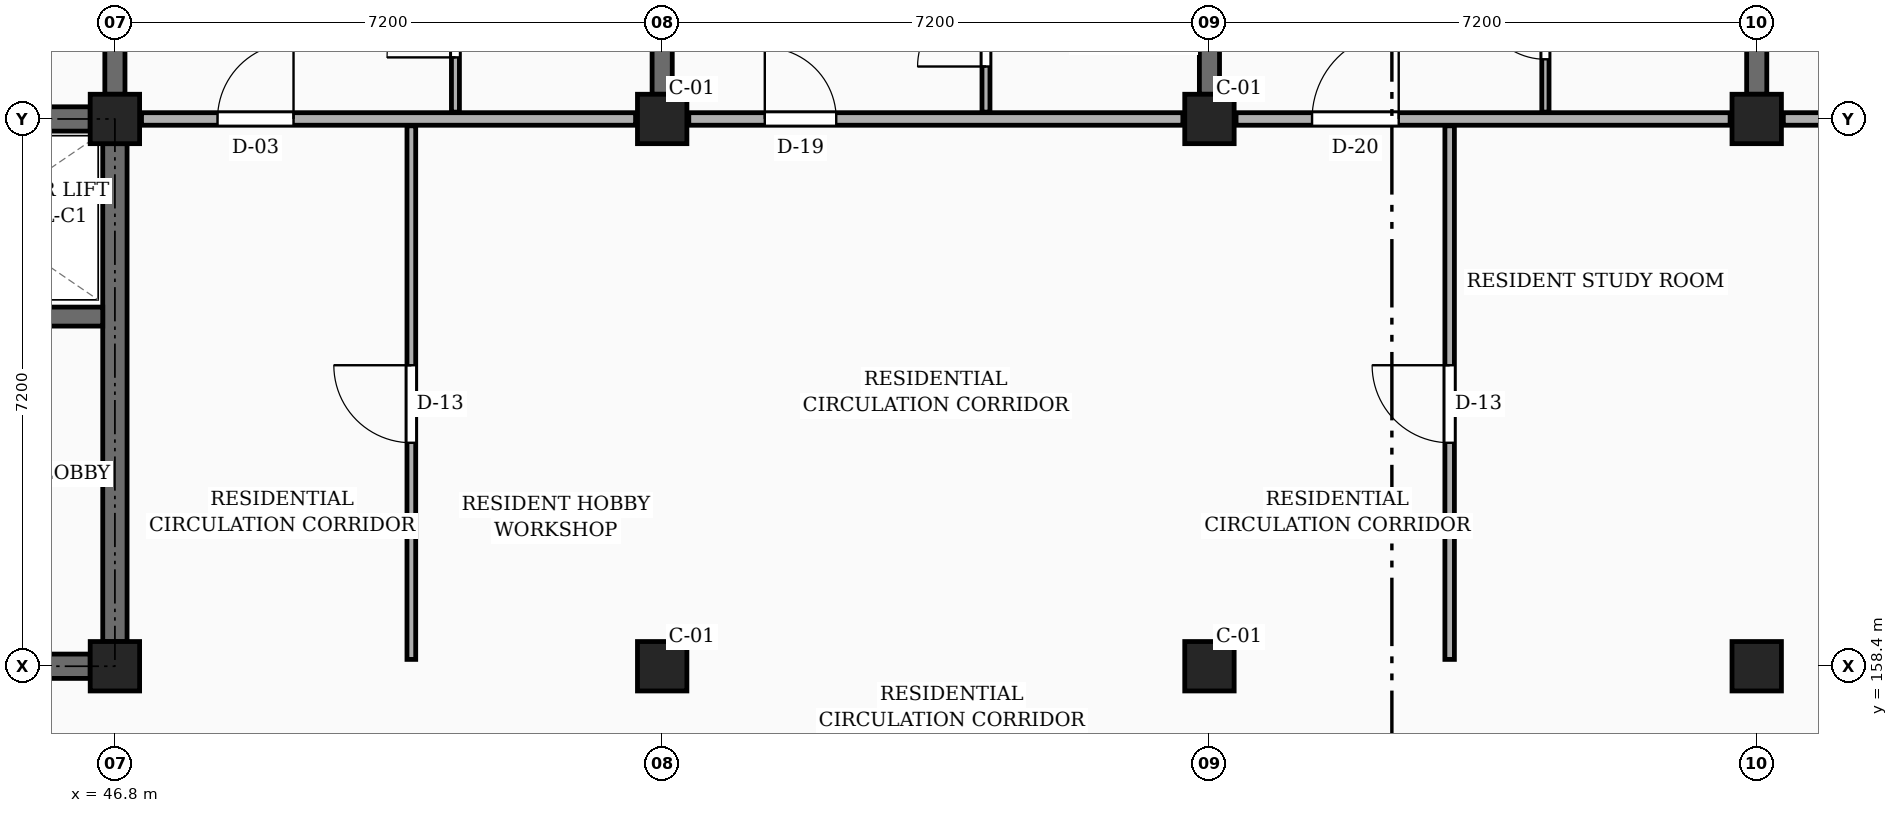
"""IFC4 building model, lengths in metres.
Left out: names, types, materials, properties, quantities, classifications, styles, units other than length and angle.
Written with IfcOpenShell. Run it as: python <this file> out.ifc"""

import sys

from ifc_helpers import new_model, si_unit, direction, frame, frame_2d, origin, origin_2d, place, context, subcontext, project, spatial, rectangle, extrude, element, fill, save


model = new_model("IFC4")
c1 = context("Model", 3, precision=1e-05, world=origin(), true_north=direction((0.0, 1.0)))
c2 = subcontext(c1, "Body", "Model", "MODEL_VIEW")
j1 = project(units=[si_unit("LENGTHUNIT", "METRE"), si_unit("PLANEANGLEUNIT", "RADIAN")], contexts=[c1])
p1 = place(None, origin())
s1 = spatial("IfcSite", under=j1, at=p1, CompositionType="ELEMENT")
p2 = place(p1, origin())
s2 = spatial("IfcBuilding", under=s1, at=p2, CompositionType="ELEMENT")
p3 = place(p2, frame((0.0, 0.0, 7.65)))
s3 = spatial("IfcBuildingStorey", under=s2, at=p3, CompositionType="ELEMENT", Elevation=7.65)
for number, where, z_axis, x_axis in (
    (1, (46.8, 158.4, 0.0), (0.0, 0.0, 1.0), (1.0, 0.0, 0.0)),
    (2, (46.8, 165.6, 0.0), (0.0, 0.0, 1.0), (1.0, 0.0, 0.0)),
    (3, (54.0, 158.4, 0.0), (0.0, 0.0, 1.0), (1.0, 0.0, 0.0)),
    (4, (54.0, 165.6, 0.0), (0.0, 0.0, 1.0), (1.0, 0.0, 0.0)),
    (5, (61.2, 158.4, 0.0), (0.0, 0.0, 1.0), (1.0, 0.0, 0.0)),
    (6, (61.2, 165.6, 0.0), (0.0, 0.0, 1.0), (1.0, 0.0, 0.0)),
    (7, (68.4, 158.4, 0.0), (0.0, 0.0, 1.0), (1.0, 0.0, 0.0)),
    (8, (68.4, 165.6, 0.0), (0.0, 0.0, 1.0), (1.0, 0.0, 0.0)),
):
    element("IfcColumn", number, at=place(p3, frame(where, z_axis=z_axis, x_axis=x_axis)), inside=s3, PredefinedType="COLUMN", context=c2, shape_type="SweptSolid", body=[
        extrude(rectangle(XDim=0.65, YDim=0.65, at=origin_2d()), origin(), (0.0, 0.0, 1.0), 3.15),
    ])
for number, where, z_axis, x_axis in (
    (9, (46.8, 165.925, 0.0), (0.0, 0.0, 1.0), (0.0, 1.0, 0.0)),
    (10, (54.0, 165.925, 0.0), (0.0, 0.0, 1.0), (0.0, 1.0, 0.0)),
    (11, (61.2, 165.925, 0.0), (0.0, 0.0, 1.0), (0.0, 1.0, 0.0)),
    (12, (68.4, 165.925, 0.0), (0.0, 0.0, 1.0), (0.0, 1.0, 0.0)),
):
    element("IfcWall", number, at=place(p3, frame(where, z_axis=z_axis, x_axis=x_axis)), inside=s3, PredefinedType="SOLIDWALL", context=c2, shape_type="SweptSolid", body=[
        extrude(rectangle(XDim=6.575, YDim=0.265, at=frame_2d((3.288, 0.0))), origin(), (0.0, 0.0, 1.0), 2.185),
    ])
p4 = place(p3, frame((39.925, 165.6, 0.0), z_axis=(0.0, 0.0, 1.0), x_axis=(1.0, 0.0, 0.0)))
e13 = element("IfcWall", 13, at=p4, inside=s3, PredefinedType="SHEAR", context=c2, shape_type="SweptSolid", body=[
    extrude(rectangle(XDim=6.55, YDim=0.32, at=frame_2d((3.275, 0.0))), origin(), (0.0, 0.0, 1.0), 2.885),
])
p5 = place(p3, frame((46.8, 158.725, 0.0), z_axis=(0.0, 0.0, 1.0), x_axis=(0.0, 1.0, 0.0)))
e14 = element("IfcWall", 14, at=p5, inside=s3, PredefinedType="SHEAR", context=c2, shape_type="SweptSolid", body=[
    extrude(rectangle(XDim=6.55, YDim=0.32, at=frame_2d((3.275, 0.0))), origin(), (0.0, 0.0, 1.0), 2.885),
])
p6 = place(p3, frame((39.925, 158.4, 0.0), z_axis=(0.0, 0.0, 1.0), x_axis=(1.0, 0.0, 0.0)))
e15 = element("IfcWall", 15, at=p6, inside=s3, PredefinedType="SHEAR", context=c2, shape_type="SweptSolid", body=[
    extrude(rectangle(XDim=6.55, YDim=0.32, at=frame_2d((3.275, 0.0))), origin(), (0.0, 0.0, 1.0), 2.885),
])
p7 = place(p6, frame((4.425, 0.0, 0.0)))
e16 = element("IfcOpeningElement", 16, at=p7, cuts=e15, PredefinedType="OPENING", context=c2, shape_type="SweptSolid", body=[
    extrude(rectangle(XDim=1.1, YDim=2.15, at=frame_2d((0.55, 1.075))), frame((0.0, 0.17, 0.0), z_axis=(0.0, -1.0, 0.0), x_axis=(1.0, 0.0, 0.0)), (0.0, 0.0, 1.0), 0.34),
])
p8 = place(p3, frame((43.325, 163.0, 0.0), z_axis=(0.0, 0.0, 1.0), x_axis=(1.0, 0.0, 0.0)))
e17 = element("IfcWall", 17, at=p8, inside=s3, PredefinedType="SHEAR", context=c2, shape_type="SweptSolid", body=[
    extrude(rectangle(XDim=3.315, YDim=0.25, at=frame_2d((1.657, 0.0))), origin(), (0.0, 0.0, 1.0), 2.885),
])
p9 = place(p8, frame((1.1, 0.0, 0.0)))
e18 = element("IfcOpeningElement", 18, at=p9, cuts=e17, PredefinedType="OPENING", context=c2, shape_type="SweptSolid", body=[
    extrude(rectangle(XDim=1.0, YDim=2.2, at=frame_2d((0.5, 1.1))), frame((0.0, 0.135, 0.0), z_axis=(0.0, -1.0, 0.0), x_axis=(1.0, 0.0, 0.0)), (0.0, 0.0, 1.0), 0.27),
])
p10 = place(p3, frame((47.15, 165.6, 0.0), z_axis=(0.0, 0.0, 1.0), x_axis=(1.0, 0.0, 0.0)))
e19 = element("IfcWall", 19, at=p10, inside=s3, PredefinedType="PARTITIONING", context=c2, shape_type="SweptSolid", body=[
    extrude(rectangle(XDim=6.5, YDim=0.165, at=frame_2d((3.25, 0.0))), origin(), (0.0, 0.0, 1.0), 2.185),
])
p11 = place(p10, frame((1.0, 0.0, 0.0)))
e20 = element("IfcOpeningElement", 20, at=p11, cuts=e19, PredefinedType="OPENING", context=c2, shape_type="SweptSolid", body=[
    extrude(rectangle(XDim=1.0, YDim=2.15, at=frame_2d((0.5, 1.075))), frame((0.0, 0.093, 0.0), z_axis=(0.0, -1.0, 0.0), x_axis=(1.0, 0.0, 0.0)), (0.0, 0.0, 1.0), 0.185),
])
p12 = place(p3, frame((54.35, 165.6, 0.0), z_axis=(0.0, 0.0, 1.0), x_axis=(1.0, 0.0, 0.0)))
e21 = element("IfcWall", 21, at=p12, inside=s3, PredefinedType="PARTITIONING", context=c2, shape_type="SweptSolid", body=[
    extrude(rectangle(XDim=6.5, YDim=0.165, at=frame_2d((3.25, 0.0))), origin(), (0.0, 0.0, 1.0), 2.185),
])
p13 = place(p12, frame((1.0, 0.0, 0.0)))
e22 = element("IfcOpeningElement", 22, at=p13, cuts=e21, PredefinedType="OPENING", context=c2, shape_type="SweptSolid", body=[
    extrude(rectangle(XDim=0.94, YDim=2.12, at=frame_2d((0.47, 1.06))), frame((0.0, 0.093, 0.0), z_axis=(0.0, -1.0, 0.0), x_axis=(1.0, 0.0, 0.0)), (0.0, 0.0, 1.0), 0.185),
])
p14 = place(p3, frame((61.55, 165.6, 0.0), z_axis=(0.0, 0.0, 1.0), x_axis=(1.0, 0.0, 0.0)))
e23 = element("IfcWall", 23, at=p14, inside=s3, PredefinedType="PARTITIONING", context=c2, shape_type="SweptSolid", body=[
    extrude(rectangle(XDim=6.5, YDim=0.165, at=frame_2d((3.25, 0.0))), origin(), (0.0, 0.0, 1.0), 2.185),
])
p15 = place(p14, frame((1.0, 0.0, 0.0)))
e24 = element("IfcOpeningElement", 24, at=p15, cuts=e23, PredefinedType="OPENING", context=c2, shape_type="SweptSolid", body=[
    extrude(rectangle(XDim=1.14, YDim=2.18, at=frame_2d((0.57, 1.09))), frame((0.0, 0.093, 0.0), z_axis=(0.0, -1.0, 0.0), x_axis=(1.0, 0.0, 0.0)), (0.0, 0.0, 1.0), 0.185),
])
p16 = place(p3, frame((68.75, 165.6, 0.0), z_axis=(0.0, 0.0, 1.0), x_axis=(1.0, 0.0, 0.0)))
e25 = element("IfcWall", 25, at=p16, inside=s3, PredefinedType="PARTITIONING", context=c2, shape_type="SweptSolid", body=[
    extrude(rectangle(XDim=6.5, YDim=0.165, at=frame_2d((3.25, 0.0))), origin(), (0.0, 0.0, 1.0), 2.185),
])
p17 = place(p16, frame((1.0, 0.0, 0.0)))
e26 = element("IfcOpeningElement", 26, at=p17, cuts=e25, PredefinedType="OPENING", context=c2, shape_type="SweptSolid", body=[
    extrude(rectangle(XDim=1.0, YDim=2.15, at=frame_2d((0.5, 1.075))), frame((0.0, 0.093, 0.0), z_axis=(0.0, -1.0, 0.0), x_axis=(1.0, 0.0, 0.0)), (0.0, 0.0, 1.0), 0.185),
])
p18 = place(p3, frame((50.7, 158.49, 0.0), z_axis=(0.0, 0.0, 1.0), x_axis=(0.0, 1.0, 0.0)))
e27 = element("IfcWall", 27, at=p18, inside=s3, PredefinedType="PARTITIONING", context=c2, shape_type="SweptSolid", body=[
    extrude(rectangle(XDim=7.02, YDim=0.115, at=frame_2d((3.51, 0.0))), origin(), (0.0, 0.0, 1.0), 2.32),
])
p19 = place(p18, frame((2.85, 0.0, 0.0)))
e28 = element("IfcOpeningElement", 28, at=p19, cuts=e27, PredefinedType="OPENING", context=c2, shape_type="SweptSolid", body=[
    extrude(rectangle(XDim=1.02, YDim=2.15, at=frame_2d((0.51, 1.075))), frame((0.0, 0.067, 0.0), z_axis=(0.0, -1.0, 0.0), x_axis=(1.0, 0.0, 0.0)), (0.0, 0.0, 1.0), 0.135),
])
p20 = place(p3, frame((51.28, 165.69, 0.0), z_axis=(0.0, 0.0, 1.0), x_axis=(0.0, 1.0, 0.0)))
e29 = element("IfcWall", 29, at=p20, inside=s3, PredefinedType="PARTITIONING", context=c2, shape_type="SweptSolid", body=[
    extrude(rectangle(XDim=2.34, YDim=0.105, at=frame_2d((1.17, 0.0))), origin(), (0.0, 0.0, 1.0), 2.32),
])
p21 = place(p20, frame((0.72, 0.0, 0.0)))
e30 = element("IfcOpeningElement", 30, at=p21, cuts=e29, PredefinedType="OPENING", context=c2, shape_type="SweptSolid", body=[
    extrude(rectangle(XDim=0.9, YDim=2.05, at=frame_2d((0.45, 1.025))), frame((0.0, 0.062, 0.0), z_axis=(0.0, -1.0, 0.0), x_axis=(1.0, 0.0, 0.0)), (0.0, 0.0, 1.0), 0.125),
])
p22 = place(p3, frame((58.26, 165.69, 0.0), z_axis=(0.0, 0.0, 1.0), x_axis=(0.0, 1.0, 0.0)))
e31 = element("IfcWall", 31, at=p22, inside=s3, PredefinedType="PARTITIONING", context=c2, shape_type="SweptSolid", body=[
    extrude(rectangle(XDim=2.1, YDim=0.105, at=frame_2d((1.05, 0.0))), origin(), (0.0, 0.0, 1.0), 2.32),
])
p23 = place(p22, frame((0.6, 0.0, 0.0)))
e32 = element("IfcOpeningElement", 32, at=p23, cuts=e31, PredefinedType="OPENING", context=c2, shape_type="SweptSolid", body=[
    extrude(rectangle(XDim=0.9, YDim=2.05, at=frame_2d((0.45, 1.025))), frame((0.0, 0.062, 0.0), z_axis=(0.0, -1.0, 0.0), x_axis=(1.0, 0.0, 0.0)), (0.0, 0.0, 1.0), 0.125),
])
p24 = place(p3, frame((64.36, 158.49, 0.0), z_axis=(0.0, 0.0, 1.0), x_axis=(0.0, 1.0, 0.0)))
e33 = element("IfcWall", 33, at=p24, inside=s3, PredefinedType="PARTITIONING", context=c2, shape_type="SweptSolid", body=[
    extrude(rectangle(XDim=7.02, YDim=0.125, at=frame_2d((3.51, 0.0))), origin(), (0.0, 0.0, 1.0), 2.32),
])
p25 = place(p24, frame((2.85, 0.0, 0.0)))
e34 = element("IfcOpeningElement", 34, at=p25, cuts=e33, PredefinedType="OPENING", context=c2, shape_type="SweptSolid", body=[
    extrude(rectangle(XDim=1.02, YDim=2.15, at=frame_2d((0.51, 1.075))), frame((0.0, 0.073, 0.0), z_axis=(0.0, -1.0, 0.0), x_axis=(1.0, 0.0, 0.0)), (0.0, 0.0, 1.0), 0.145),
])
p26 = place(p3, frame((65.62, 165.69, 0.0), z_axis=(0.0, 0.0, 1.0), x_axis=(0.0, 1.0, 0.0)))
e35 = element("IfcWall", 35, at=p26, inside=s3, PredefinedType="PARTITIONING", context=c2, shape_type="SweptSolid", body=[
    extrude(rectangle(XDim=2.26, YDim=0.095, at=frame_2d((1.13, 0.0))), origin(), (0.0, 0.0, 1.0), 2.32),
])
p27 = place(p26, frame((0.695, 0.0, 0.0)))
e36 = element("IfcOpeningElement", 36, at=p27, cuts=e35, PredefinedType="OPENING", context=c2, shape_type="SweptSolid", body=[
    extrude(rectangle(XDim=0.87, YDim=2.05, at=frame_2d((0.435, 1.025))), frame((0.0, 0.058, 0.0), z_axis=(0.0, -1.0, 0.0), x_axis=(1.0, 0.0, 0.0)), (0.0, 0.0, 1.0), 0.115),
])
p28 = place(p11, origin())
e37 = element("IfcDoor", 37, at=p28, inside=s3, OperationType="SINGLE_SWING_RIGHT", PredefinedType="DOOR", context=c2, shape_type="SweptSolid", body=[
    extrude(rectangle(XDim=1.0, YDim=2.15, at=frame_2d((0.5, 1.075))), frame((0.0, 0.025, 0.0), z_axis=(0.0, -1.0, 0.0), x_axis=(1.0, 0.0, 0.0)), (0.0, 0.0, 1.0), 0.05),
])
fill(e20, e37)
p29 = place(p13, origin())
e38 = element("IfcDoor", 38, at=p29, inside=s3, OperationType="SINGLE_SWING_LEFT", PredefinedType="DOOR", context=c2, shape_type="SweptSolid", body=[
    extrude(rectangle(XDim=0.94, YDim=2.12, at=frame_2d((0.47, 1.06))), frame((0.0, 0.025, 0.0), z_axis=(0.0, -1.0, 0.0), x_axis=(1.0, 0.0, 0.0)), (0.0, 0.0, 1.0), 0.05),
])
fill(e22, e38)
p30 = place(p15, origin())
e39 = element("IfcDoor", 39, at=p30, inside=s3, OperationType="SINGLE_SWING_RIGHT", PredefinedType="DOOR", context=c2, shape_type="SweptSolid", body=[
    extrude(rectangle(XDim=1.14, YDim=2.18, at=frame_2d((0.57, 1.09))), frame((0.0, 0.025, 0.0), z_axis=(0.0, -1.0, 0.0), x_axis=(1.0, 0.0, 0.0)), (0.0, 0.0, 1.0), 0.05),
])
fill(e24, e39)
p31 = place(p19, origin())
e40 = element("IfcDoor", 40, at=p31, inside=s3, OperationType="SINGLE_SWING_RIGHT", PredefinedType="DOOR", context=c2, shape_type="SweptSolid", body=[
    extrude(rectangle(XDim=1.02, YDim=2.15, at=frame_2d((0.51, 1.075))), frame((0.0, 0.025, 0.0), z_axis=(0.0, -1.0, 0.0), x_axis=(1.0, 0.0, 0.0)), (0.0, 0.0, 1.0), 0.05),
])
fill(e28, e40)
p32 = place(p21, origin())
e41 = element("IfcDoor", 41, at=p32, inside=s3, OperationType="SINGLE_SWING_LEFT", PredefinedType="DOOR", context=c2, shape_type="SweptSolid", body=[
    extrude(rectangle(XDim=0.9, YDim=2.05, at=frame_2d((0.45, 1.025))), frame((0.0, 0.025, 0.0), z_axis=(0.0, -1.0, 0.0), x_axis=(1.0, 0.0, 0.0)), (0.0, 0.0, 1.0), 0.05),
])
fill(e30, e41)
p33 = place(p23, origin())
e42 = element("IfcDoor", 42, at=p33, inside=s3, OperationType="SINGLE_SWING_LEFT", PredefinedType="DOOR", context=c2, shape_type="SweptSolid", body=[
    extrude(rectangle(XDim=0.9, YDim=2.05, at=frame_2d((0.45, 1.025))), frame((0.0, 0.025, 0.0), z_axis=(0.0, -1.0, 0.0), x_axis=(1.0, 0.0, 0.0)), (0.0, 0.0, 1.0), 0.05),
])
fill(e32, e42)
p34 = place(p25, origin())
e43 = element("IfcDoor", 43, at=p34, inside=s3, OperationType="SINGLE_SWING_RIGHT", PredefinedType="DOOR", context=c2, shape_type="SweptSolid", body=[
    extrude(rectangle(XDim=1.02, YDim=2.15, at=frame_2d((0.51, 1.075))), frame((0.0, 0.025, 0.0), z_axis=(0.0, -1.0, 0.0), x_axis=(1.0, 0.0, 0.0)), (0.0, 0.0, 1.0), 0.05),
])
fill(e34, e43)
p35 = place(p27, origin())
e44 = element("IfcDoor", 44, at=p35, inside=s3, OperationType="SINGLE_SWING_RIGHT", PredefinedType="DOOR", context=c2, shape_type="SweptSolid", body=[
    extrude(rectangle(XDim=0.87, YDim=2.05, at=frame_2d((0.435, 1.025))), frame((0.0, 0.025, 0.0), z_axis=(0.0, -1.0, 0.0), x_axis=(1.0, 0.0, 0.0)), (0.0, 0.0, 1.0), 0.05),
])
fill(e36, e44)
save(model, sys.argv[1])
